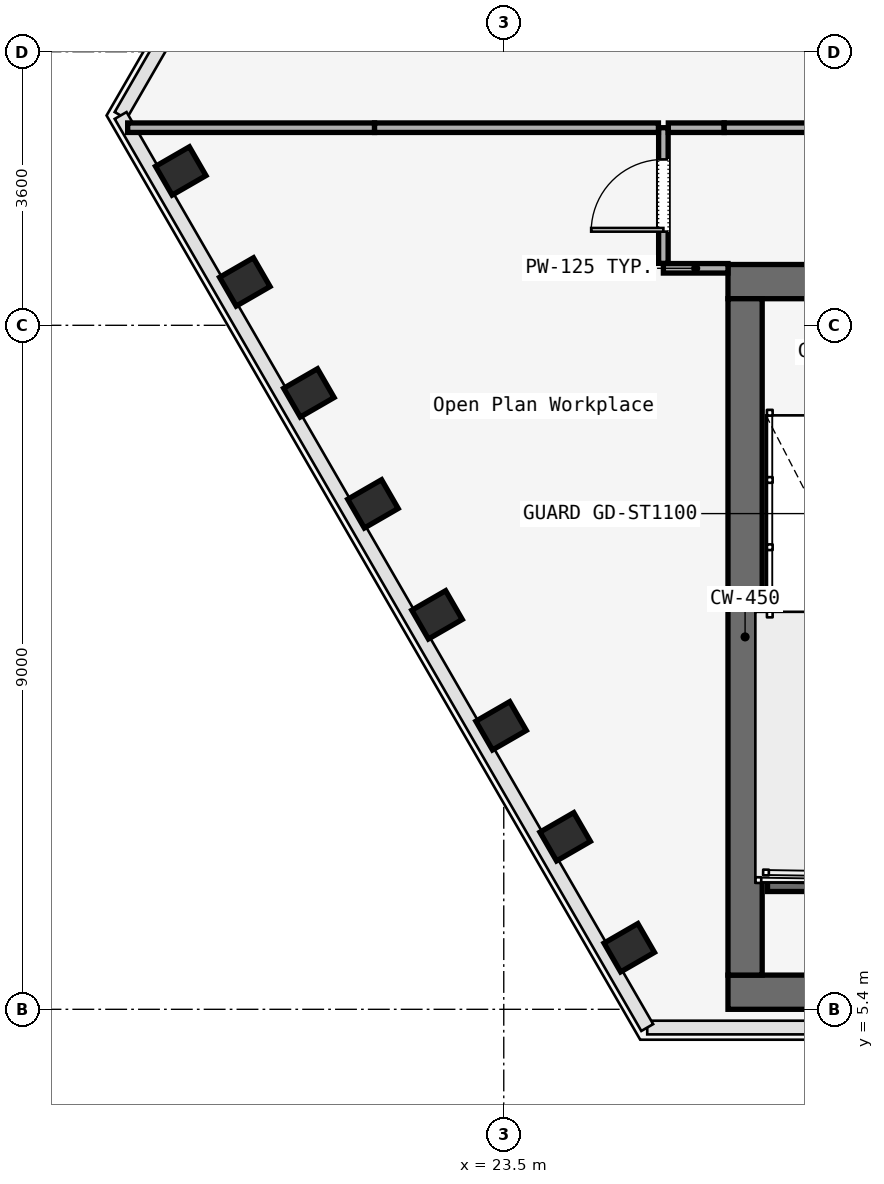
"""IFC4 building model, lengths in metres.
Left out: names, types, materials, properties, quantities, classifications, styles, units other than length and angle.
Written with IfcOpenShell. Run it as: python <this file> out.ifc"""

import sys

from ifc_helpers import new_model, si_unit, direction, frame, frame_2d, origin, origin_2d, place, context, subcontext, project, spatial, rectangle, i_section, extrude, element, fill, save


model = new_model("IFC4")
c1 = context("Model", 3, precision=1e-05, world=origin(), true_north=direction((0.0, 1.0)))
c2 = subcontext(c1, "Body", "Model", "MODEL_VIEW")
j1 = project(units=[si_unit("LENGTHUNIT", "METRE"), si_unit("PLANEANGLEUNIT", "RADIAN")], contexts=[c1])
p1 = place(None, origin())
s1 = spatial("IfcSite", under=j1, at=p1, CompositionType="ELEMENT")
p2 = place(p1, origin())
s2 = spatial("IfcBuilding", under=s1, at=p2, CompositionType="ELEMENT")
p3 = place(p2, frame((0.0, 0.0, 96.8)))
s3 = spatial("IfcBuildingStorey", under=s2, at=p3, CompositionType="ELEMENT", Elevation=96.8)
p4 = place(p3, frame((26.45, 14.975, 0.0), z_axis=(0.0, 0.0, 1.0), x_axis=(1.0, 0.0, 0.0)))
e1 = element("IfcWall", 1, at=p4, inside=s3, PredefinedType="SOLIDWALL", context=c2, shape_type="SweptSolid", body=[
    extrude(rectangle(XDim=31.1, YDim=0.45, at=frame_2d((15.55, 0.0))), origin(), (0.0, 0.0, 1.0), 3.58),
])
p5 = place(p4, frame((1.65, 0.0, 0.0)))
e2 = element("IfcOpeningElement", 2, at=p5, cuts=e1, PredefinedType="OPENING", context=c2, shape_type="SweptSolid", body=[
    extrude(rectangle(XDim=1.1, YDim=2.2, at=frame_2d((0.55, 1.1))), frame((0.0, 0.225, 0.0), z_axis=(0.0, -1.0, 0.0), x_axis=(1.0, 0.0, 0.0)), (0.0, 0.0, 1.0), 0.45),
])
p6 = place(p4, frame((13.65, 0.0, 0.0)))
e3 = element("IfcOpeningElement", 3, at=p6, cuts=e1, PredefinedType="OPENING", context=c2, shape_type="SweptSolid", body=[
    extrude(rectangle(XDim=1.1, YDim=2.2, at=frame_2d((0.55, 1.1))), frame((0.0, 0.225, 0.0), z_axis=(0.0, -1.0, 0.0), x_axis=(1.0, 0.0, 0.0)), (0.0, 0.0, 1.0), 0.45),
])
p7 = place(p4, frame((25.55, 0.0, 0.0)))
e4 = element("IfcOpeningElement", 4, at=p7, cuts=e1, PredefinedType="OPENING", context=c2, shape_type="SweptSolid", body=[
    extrude(rectangle(XDim=1.1, YDim=2.2, at=frame_2d((0.55, 1.1))), frame((0.0, 0.225, 0.0), z_axis=(0.0, -1.0, 0.0), x_axis=(1.0, 0.0, 0.0)), (0.0, 0.0, 1.0), 0.45),
])
p8 = place(p4, frame((10.7, 0.0, 0.0)))
e5 = element("IfcOpeningElement", 5, at=p8, cuts=e1, PredefinedType="OPENING", context=c2, shape_type="SweptSolid", body=[
    extrude(rectangle(XDim=1.4, YDim=2.2, at=frame_2d((0.7, 1.1))), frame((0.0, 0.225, 0.0), z_axis=(0.0, -1.0, 0.0), x_axis=(1.0, 0.0, 0.0)), (0.0, 0.0, 1.0), 0.45),
])
p9 = place(p4, frame((19.35, 0.0, 0.0)))
e6 = element("IfcOpeningElement", 6, at=p9, cuts=e1, PredefinedType="OPENING", context=c2, shape_type="SweptSolid", body=[
    extrude(rectangle(XDim=1.1, YDim=2.2, at=frame_2d((0.55, 1.1))), frame((0.0, 0.225, 0.0), z_axis=(0.0, -1.0, 0.0), x_axis=(1.0, 0.0, 0.0)), (0.0, 0.0, 1.0), 0.45),
])
p10 = place(p4, frame((21.4, 0.0, 0.0)))
e7 = element("IfcOpeningElement", 7, at=p10, cuts=e1, PredefinedType="OPENING", context=c2, shape_type="SweptSolid", body=[
    extrude(rectangle(XDim=0.9, YDim=2.1, at=frame_2d((0.45, 1.05))), frame((0.0, 0.225, 0.0), z_axis=(0.0, -1.0, 0.0), x_axis=(1.0, 0.0, 0.0)), (0.0, 0.0, 1.0), 0.45),
])
p11 = place(p4, frame((23.35, 0.0, 0.0)))
e8 = element("IfcOpeningElement", 8, at=p11, cuts=e1, PredefinedType="OPENING", context=c2, shape_type="SweptSolid", body=[
    extrude(rectangle(XDim=1.3, YDim=2.3, at=frame_2d((0.65, 1.15))), frame((0.0, 0.225, 0.0), z_axis=(0.0, -1.0, 0.0), x_axis=(1.0, 0.0, 0.0)), (0.0, 0.0, 1.0), 0.45),
])
p12 = place(p3, frame((26.45, 5.625, 0.0), z_axis=(0.0, 0.0, 1.0), x_axis=(1.0, 0.0, 0.0)))
e9 = element("IfcWall", 9, at=p12, inside=s3, PredefinedType="SOLIDWALL", context=c2, shape_type="SweptSolid", body=[
    extrude(rectangle(XDim=31.1, YDim=0.45, at=frame_2d((15.55, 0.0))), origin(), (0.0, 0.0, 1.0), 3.58),
])
p13 = place(p3, frame((26.675, 5.85, 0.0), z_axis=(0.0, 0.0, 1.0), x_axis=(0.0, 1.0, 0.0)))
e10 = element("IfcWall", 10, at=p13, inside=s3, PredefinedType="SOLIDWALL", context=c2, shape_type="SweptSolid", body=[
    extrude(rectangle(XDim=8.9, YDim=0.45, at=frame_2d((4.45, 0.0))), origin(), (0.0, 0.0, 1.0), 3.58),
])
p14 = place(p3, frame((19.25, 16.431, 0.0), z_axis=(-0.007813879948, -0.085544998738, 0.996303666796), x_axis=(-0.419441460984, 0.904729024715, 0.074392557737)))
e11 = element("IfcColumn", 11, at=p14, inside=s3, PredefinedType="COLUMN", context=c2, shape_type="SweptSolid", body=[
    extrude(i_section(OverallWidth=0.437, OverallDepth=0.514, WebThickness=0.061, FlangeThickness=0.077, FilletRadius=0.015, at=origin_2d()), origin(), (0.0, 0.0, 1.0), 3.593),
])
p15 = place(p3, frame((20.093, 14.971, 0.0), z_axis=(-0.014416733271, -0.074259777036, 0.997134716734), x_axis=(-0.326260743048, 0.943006977722, 0.065511583042)))
e12 = element("IfcColumn", 12, at=p15, inside=s3, PredefinedType="COLUMN", context=c2, shape_type="SweptSolid", body=[
    extrude(i_section(OverallWidth=0.437, OverallDepth=0.514, WebThickness=0.061, FlangeThickness=0.077, FilletRadius=0.015, at=origin_2d()), origin(), (0.0, 0.0, 1.0), 3.59),
])
p16 = place(p3, frame((20.936, 13.51, 0.0), z_axis=(-0.021027083222, -0.062877103228, 0.99779974527), x_axis=(-0.200130658839, 0.978085358309, 0.057417342801)))
e13 = element("IfcColumn", 13, at=p16, inside=s3, PredefinedType="COLUMN", context=c2, shape_type="SweptSolid", body=[
    extrude(i_section(OverallWidth=0.437, OverallDepth=0.514, WebThickness=0.061, FlangeThickness=0.077, FilletRadius=0.015, at=origin_2d()), origin(), (0.0, 0.0, 1.0), 3.588),
])
p17 = place(p3, frame((21.779, 12.05, 0.0), z_axis=(-0.027709573034, -0.051402279216, 0.998293536618), x_axis=(-0.029880740792, 0.998273324431, 0.050571840581)))
e14 = element("IfcColumn", 14, at=p17, inside=s3, PredefinedType="COLUMN", context=c2, shape_type="SweptSolid", body=[
    extrude(i_section(OverallWidth=0.437, OverallDepth=0.514, WebThickness=0.061, FlangeThickness=0.077, FilletRadius=0.015, at=origin_2d()), origin(), (0.0, 0.0, 1.0), 3.586),
])
p18 = place(p3, frame((22.622, 10.59, 0.0), z_axis=(-0.034324388219, -0.040045119589, 0.998608143753), x_axis=(0.183189108022, 0.982015997466, 0.045676377068)))
e15 = element("IfcColumn", 15, at=p18, inside=s3, PredefinedType="COLUMN", context=c2, shape_type="SweptSolid", body=[
    extrude(i_section(OverallWidth=0.437, OverallDepth=0.514, WebThickness=0.061, FlangeThickness=0.077, FilletRadius=0.015, at=origin_2d()), origin(), (0.0, 0.0, 1.0), 3.585),
])
p19 = place(p3, frame((23.465, 9.13, 0.0), z_axis=(-0.040936452002, -0.028539722777, 0.998754069389), x_axis=(0.42358129763, 0.904826587054, 0.043217261123)))
e16 = element("IfcColumn", 16, at=p19, inside=s3, PredefinedType="COLUMN", context=c2, shape_type="SweptSolid", body=[
    extrude(i_section(OverallWidth=0.437, OverallDepth=0.514, WebThickness=0.061, FlangeThickness=0.077, FilletRadius=0.015, at=origin_2d()), origin(), (0.0, 0.0, 1.0), 3.584),
])
p20 = place(p3, frame((24.308, 7.67, 0.0), z_axis=(-0.047474003904, -0.017164202272, 0.998724991734), x_axis=(0.643386474884, 0.764292189396, 0.043718338998)))
e17 = element("IfcColumn", 17, at=p20, inside=s3, PredefinedType="COLUMN", context=c2, shape_type="SweptSolid", body=[
    extrude(i_section(OverallWidth=0.437, OverallDepth=0.514, WebThickness=0.061, FlangeThickness=0.077, FilletRadius=0.015, at=origin_2d()), origin(), (0.0, 0.0, 1.0), 3.584),
])
p21 = place(p3, frame((25.151, 6.21, 0.0), z_axis=(-0.054069822092, -0.005652135055, 0.998521160371), x_axis=(0.808074623925, 0.587195693912, 0.047080985746)))
e18 = element("IfcColumn", 18, at=p21, inside=s3, PredefinedType="COLUMN", context=c2, shape_type="SweptSolid", body=[
    extrude(i_section(OverallWidth=0.437, OverallDepth=0.514, WebThickness=0.061, FlangeThickness=0.077, FilletRadius=0.015, at=origin_2d()), origin(), (0.0, 0.0, 1.0), 3.585),
])
p22 = place(p3, frame((26.97, 7.05, 0.0), z_axis=(0.0, 0.0, 1.0), x_axis=(1.0, 0.0, 0.0)))
e19 = element("IfcWall", 19, at=p22, inside=s3, PredefinedType="SOLIDWALL", context=c2, shape_type="SweptSolid", body=[
    extrude(rectangle(XDim=3.115, YDim=0.2, at=frame_2d((1.558, 0.0))), origin(), (0.0, 0.0, 1.0), 3.8),
])
p23 = place(p3, frame((26.45, 15.15, 0.0), z_axis=(0.0, 0.0, 1.0), x_axis=(-1.0, 0.0, 0.0)))
e20 = element("IfcWall", 20, at=p23, inside=s3, PredefinedType="PARTITIONING", context=c2, shape_type="SweptSolid", body=[
    extrude(rectangle(XDim=0.85, YDim=0.125, at=frame_2d((0.425, 0.0))), origin(), (0.0, 0.0, 1.0), 2.95),
])
p24 = place(p3, frame((25.6, 15.215, 0.0), z_axis=(0.0, 0.0, 1.0), x_axis=(0.0, 1.0, 0.0)))
e21 = element("IfcWall", 21, at=p24, inside=s3, PredefinedType="PARTITIONING", context=c2, shape_type="SweptSolid", body=[
    extrude(rectangle(XDim=1.785, YDim=0.125, at=frame_2d((0.893, 0.0))), origin(), (0.0, 0.0, 1.0), 2.95),
])
p25 = place(p24, frame((0.417, 0.0, 0.0)))
e22 = element("IfcOpeningElement", 22, at=p25, cuts=e21, PredefinedType="OPENING", context=c2, shape_type="SweptSolid", body=[
    extrude(rectangle(XDim=0.95, YDim=2.2, at=frame_2d((0.475, 1.1))), frame((0.0, 0.062, 0.0), z_axis=(0.0, -1.0, 0.0), x_axis=(1.0, 0.0, 0.0)), (0.0, 0.0, 1.0), 0.125),
])
p26 = place(p3, frame((25.665, 17.0, 0.0), z_axis=(0.0, 0.0, 1.0), x_axis=(1.0, 0.0, 0.0)))
e23 = element("IfcWall", 23, at=p26, inside=s3, PredefinedType="PARTITIONING", context=c2, shape_type="SweptSolid", body=[
    extrude(rectangle(XDim=0.735, YDim=0.125, at=frame_2d((0.367, 0.0))), origin(), (0.0, 0.0, 1.0), 2.95),
])
p27 = place(p3, frame((26.4, 17.0, 0.0), z_axis=(0.0, 0.0, 1.0), x_axis=(1.0, 0.0, 0.0)))
e24 = element("IfcWall", 24, at=p27, inside=s3, PredefinedType="PARTITIONING", context=c2, shape_type="SweptSolid", body=[
    extrude(rectangle(XDim=3.4, YDim=0.125, at=frame_2d((1.7, 0.0))), origin(), (0.0, 0.0, 1.0), 2.95),
])
p28 = place(p3, frame((18.552, 17.0, 0.0), z_axis=(0.0, 0.0, 1.0), x_axis=(1.0, 0.0, 0.0)))
e25 = element("IfcWall", 25, at=p28, inside=s3, PredefinedType="PARTITIONING", context=c2, shape_type="SweptSolid", body=[
    extrude(rectangle(XDim=3.248, YDim=0.125, at=frame_2d((1.624, 0.0))), origin(), (0.0, 0.0, 1.0), 2.95),
])
p29 = place(p3, frame((21.8, 17.0, 0.0), z_axis=(0.0, 0.0, 1.0), x_axis=(1.0, 0.0, 0.0)))
e26 = element("IfcWall", 26, at=p29, inside=s3, PredefinedType="PARTITIONING", context=c2, shape_type="SweptSolid", body=[
    extrude(rectangle(XDim=3.735, YDim=0.125, at=frame_2d((1.867, 0.0))), origin(), (0.0, 0.0, 1.0), 2.95),
])
p30 = place(p25, origin())
e27 = element("IfcDoor", 27, at=p30, inside=s3, OperationType="SINGLE_SWING_LEFT", PredefinedType="DOOR", context=c2, shape_type="SweptSolid", body=[
    extrude(rectangle(XDim=0.95, YDim=2.2, at=frame_2d((0.475, 1.1))), frame((0.0, 0.025, 0.0), z_axis=(0.0, -1.0, 0.0), x_axis=(1.0, 0.0, 0.0)), (0.0, 0.0, 1.0), 0.05),
])
fill(e22, e27)
save(model, sys.argv[1])
